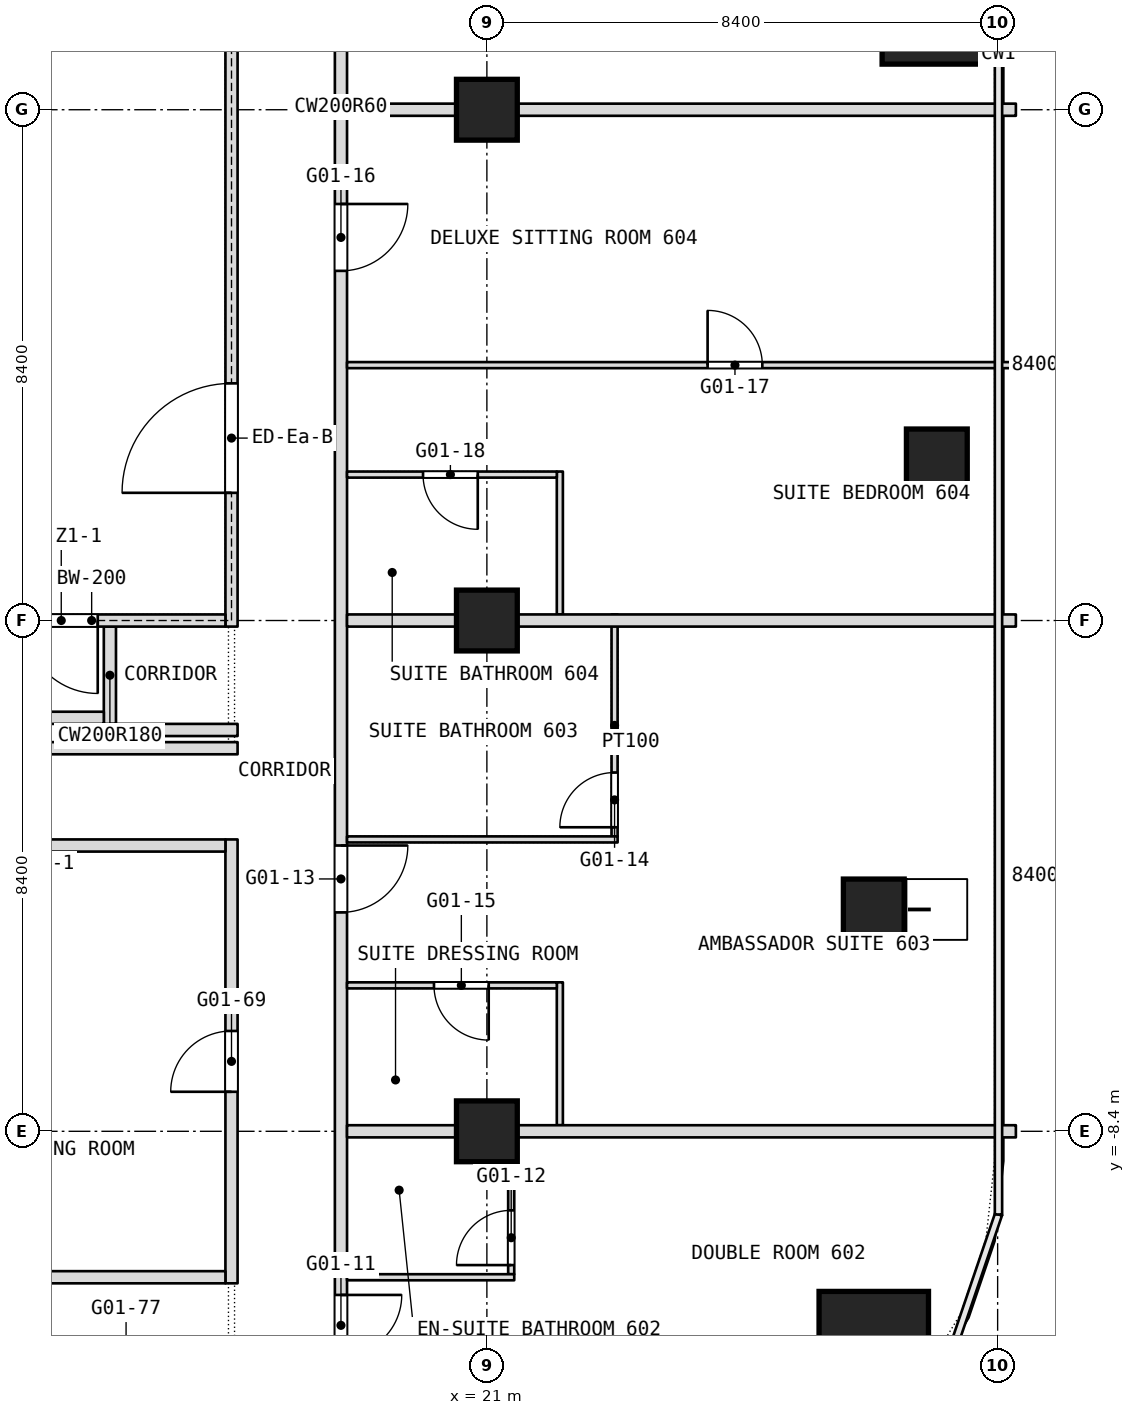
"""IFC4 building model, lengths in metres.
Left out: names, types, materials, properties, quantities, classifications, styles, units other than length and angle.
Written with IfcOpenShell. Run it as: python <this file> out.ifc"""

import sys

from ifc_helpers import new_model, si_unit, direction, frame, frame_2d, origin, origin_2d, place, context, subcontext, project, spatial, rectangle, extrude, element, fill, save


model = new_model("IFC4")
c1 = context("Model", 3, precision=1e-05, world=origin(), true_north=direction((0.0, 1.0)))
c2 = subcontext(c1, "Body", "Model", "MODEL_VIEW")
j1 = project(units=[si_unit("LENGTHUNIT", "METRE"), si_unit("PLANEANGLEUNIT", "RADIAN")], contexts=[c1])
p1 = place(None, origin())
s1 = spatial("IfcSite", under=j1, at=p1, CompositionType="ELEMENT")
p2 = place(p1, origin())
s2 = spatial("IfcBuilding", under=s1, at=p2, CompositionType="ELEMENT")
p3 = place(p2, frame((0.0, 0.0, 36.5)))
s3 = spatial("IfcBuildingStorey", under=s2, at=p3, CompositionType="ELEMENT", Elevation=36.5)
p4 = place(p3, frame((27.363, -11.933, -0.15), z_axis=(0.0, 0.0, 1.0), x_axis=(1.0, 0.0, 0.0)))
e1 = element("IfcColumn", 1, at=p4, inside=s3, PredefinedType="COLUMN", context=c2, shape_type="SweptSolid", body=[
    extrude(rectangle(XDim=1.8, YDim=1.8, at=origin_2d()), origin(), (0.0, 0.0, 1.0), 3.75),
])
p5 = place(p3, frame((28.4, 10.05, 0.0), z_axis=(0.0, 0.0, 1.0), x_axis=(1.0, 0.0, 0.0)))
e2 = element("IfcColumn", 2, at=p5, inside=s3, PredefinedType="COLUMN", context=c2, shape_type="SweptSolid", body=[
    extrude(rectangle(XDim=1.8, YDim=1.8, at=origin_2d()), origin(), (0.0, 0.0, 1.0), 3.6),
])
p6 = place(p3, frame((21.0, -8.4, -0.15), z_axis=(0.0, 0.0, 1.0), x_axis=(1.0, 0.0, 0.0)))
e3 = element("IfcColumn", 3, at=p6, inside=s3, PredefinedType="COLUMN", context=c2, shape_type="SweptSolid", body=[
    extrude(rectangle(XDim=1.0, YDim=1.0, at=origin_2d()), origin(), (0.0, 0.0, 1.0), 3.75),
])
for number, where, z_axis, x_axis in (
    (4, (21.0, 0.0, 0.0), (0.0, 0.0, 1.0), (1.0, 0.0, 0.0)),
    (5, (21.0, 8.4, 0.0), (0.0, 0.0, 1.0), (1.0, 0.0, 0.0)),
    (6, (28.4, 2.649, 0.0), (0.0, 0.0, 1.0), (1.0, 0.0, 0.0)),
):
    element("IfcColumn", number, at=place(p3, frame(where, z_axis=z_axis, x_axis=x_axis)), inside=s3, PredefinedType="COLUMN", context=c2, shape_type="SweptSolid", body=[
        extrude(rectangle(XDim=1.0, YDim=1.0, at=origin_2d()), origin(), (0.0, 0.0, 1.0), 3.6),
    ])
p7 = place(p3, frame((23.1, -3.55, 0.0), z_axis=(0.0, 0.0, 1.0), x_axis=(0.0, 1.0, 0.0)))
e7 = element("IfcWall", 7, at=p7, inside=s3, PredefinedType="PARTITIONING", context=c2, shape_type="SweptSolid", body=[
    extrude(rectangle(XDim=3.65, YDim=0.1, at=frame_2d((1.825, 0.0))), origin(), (0.0, 0.0, 1.0), 3.34),
])
p8 = place(p7, frame((0.15, 0.0, 0.0)))
e8 = element("IfcOpeningElement", 8, at=p8, cuts=e7, PredefinedType="OPENING", context=c2, shape_type="SweptSolid", body=[
    extrude(rectangle(XDim=0.9, YDim=2.1, at=frame_2d((0.45, 1.05))), frame((0.0, 0.05, 0.0), z_axis=(0.0, -1.0, 0.0), x_axis=(1.0, 0.0, 0.0)), (0.0, 0.0, 1.0), 0.1),
])
p9 = place(p3, frame((22.2, -8.3, 0.0), z_axis=(0.0, 0.0, 1.0), x_axis=(0.0, 1.0, 0.0)))
e9 = element("IfcWall", 9, at=p9, inside=s3, PredefinedType="PARTITIONING", context=c2, shape_type="SweptSolid", body=[
    extrude(rectangle(XDim=2.35, YDim=0.1, at=frame_2d((1.175, 0.0))), origin(), (0.0, 0.0, 1.0), 3.34),
])
p10 = place(p3, frame((22.2, 0.1, 0.0), z_axis=(0.0, 0.0, 1.0), x_axis=(0.0, 1.0, 0.0)))
e10 = element("IfcWall", 10, at=p10, inside=s3, PredefinedType="PARTITIONING", context=c2, shape_type="SweptSolid", body=[
    extrude(rectangle(XDim=2.35, YDim=0.1, at=frame_2d((1.175, 0.0))), origin(), (0.0, 0.0, 1.0), 3.34),
])
p11 = place(p3, frame((21.4, -10.75, 0.0), z_axis=(0.0, 0.0, 1.0), x_axis=(0.0, 1.0, 0.0)))
e11 = element("IfcWall", 11, at=p11, inside=s3, PredefinedType="PARTITIONING", context=c2, shape_type="SweptSolid", body=[
    extrude(rectangle(XDim=2.45, YDim=0.1, at=frame_2d((1.225, 0.0))), origin(), (0.0, 0.0, 1.0), 3.34),
])
p12 = place(p11, frame((0.15, 0.0, 0.0)))
e12 = element("IfcOpeningElement", 12, at=p12, cuts=e11, PredefinedType="OPENING", context=c2, shape_type="SweptSolid", body=[
    extrude(rectangle(XDim=0.9, YDim=2.1, at=frame_2d((0.45, 1.05))), frame((0.0, 0.05, 0.0), z_axis=(0.0, -1.0, 0.0), x_axis=(1.0, 0.0, 0.0)), (0.0, 0.0, 1.0), 0.1),
])
p13 = place(p3, frame((18.6, -16.665, 0.0), z_axis=(0.0, 0.0, 1.0), x_axis=(0.0, 1.0, 0.0)))
e13 = element("IfcWall", 13, at=p13, inside=s3, PredefinedType="PARTITIONING", context=c2, shape_type="SweptSolid", body=[
    extrude(rectangle(XDim=50.205, YDim=0.2, at=frame_2d((25.103, 0.0))), origin(), (0.0, 0.0, 1.0), 3.34),
])
p14 = place(p13, frame((2.991, 0.0, 0.0)))
e14 = element("IfcOpeningElement", 14, at=p14, cuts=e13, PredefinedType="OPENING", context=c2, shape_type="SweptSolid", body=[
    extrude(rectangle(XDim=1.0, YDim=2.1, at=frame_2d((0.5, 1.05))), frame((0.0, 0.1, 0.0), z_axis=(0.0, -1.0, 0.0), x_axis=(1.0, 0.0, 0.0)), (0.0, 0.0, 1.0), 0.2),
])
p15 = place(p13, frame((4.574, 0.0, 0.0)))
e15 = element("IfcOpeningElement", 15, at=p15, cuts=e13, PredefinedType="OPENING", context=c2, shape_type="SweptSolid", body=[
    extrude(rectangle(XDim=1.0, YDim=2.1, at=frame_2d((0.5, 1.05))), frame((0.0, 0.1, 0.0), z_axis=(0.0, -1.0, 0.0), x_axis=(1.0, 0.0, 0.0)), (0.0, 0.0, 1.0), 0.2),
])
p16 = place(p13, frame((11.865, 0.0, 0.0)))
e16 = element("IfcOpeningElement", 16, at=p16, cuts=e13, PredefinedType="OPENING", context=c2, shape_type="SweptSolid", body=[
    extrude(rectangle(XDim=1.1, YDim=2.1, at=frame_2d((0.55, 1.05))), frame((0.0, 0.1, 0.0), z_axis=(0.0, -1.0, 0.0), x_axis=(1.0, 0.0, 0.0)), (0.0, 0.0, 1.0), 0.2),
])
p17 = place(p13, frame((22.415, 0.0, 0.0)))
e17 = element("IfcOpeningElement", 17, at=p17, cuts=e13, PredefinedType="OPENING", context=c2, shape_type="SweptSolid", body=[
    extrude(rectangle(XDim=1.1, YDim=2.1, at=frame_2d((0.55, 1.05))), frame((0.0, 0.1, 0.0), z_axis=(0.0, -1.0, 0.0), x_axis=(1.0, 0.0, 0.0)), (0.0, 0.0, 1.0), 0.2),
])
p18 = place(p13, frame((28.365, 0.0, 0.0)))
e18 = element("IfcOpeningElement", 18, at=p18, cuts=e13, PredefinedType="OPENING", context=c2, shape_type="SweptSolid", body=[
    extrude(rectangle(XDim=1.8, YDim=2.1, at=frame_2d((0.9, 1.05))), frame((0.0, 0.1, 0.0), z_axis=(0.0, -1.0, 0.0), x_axis=(1.0, 0.0, 0.0)), (0.0, 0.0, 1.0), 0.2),
])
p19 = place(p13, frame((36.765, 0.0, 0.0)))
e19 = element("IfcOpeningElement", 19, at=p19, cuts=e13, PredefinedType="OPENING", context=c2, shape_type="SweptSolid", body=[
    extrude(rectangle(XDim=1.8, YDim=2.1, at=frame_2d((0.9, 1.05))), frame((0.0, 0.1, 0.0), z_axis=(0.0, -1.0, 0.0), x_axis=(1.0, 0.0, 0.0)), (0.0, 0.0, 1.0), 0.2),
])
p20 = place(p13, frame((42.265, 0.0, 0.0)))
e20 = element("IfcOpeningElement", 20, at=p20, cuts=e13, PredefinedType="OPENING", context=c2, shape_type="SweptSolid", body=[
    extrude(rectangle(XDim=1.0, YDim=2.1, at=frame_2d((0.5, 1.05))), frame((0.0, 0.1, 0.0), z_axis=(0.0, -1.0, 0.0), x_axis=(1.0, 0.0, 0.0)), (0.0, 0.0, 1.0), 0.2),
])
p21 = place(p13, frame((47.465, 0.0, 0.0)))
e21 = element("IfcOpeningElement", 21, at=p21, cuts=e13, PredefinedType="OPENING", context=c2, shape_type="SweptSolid", body=[
    extrude(rectangle(XDim=1.0, YDim=2.1, at=frame_2d((0.5, 1.05))), frame((0.0, 0.1, 0.0), z_axis=(0.0, -1.0, 0.0), x_axis=(1.0, 0.0, 0.0)), (0.0, 0.0, 1.0), 0.2),
])
p22 = place(p3, frame((16.8, -10.9, 0.0), z_axis=(0.0, 0.0, 1.0), x_axis=(0.0, 1.0, 0.0)))
e22 = element("IfcWall", 22, at=p22, inside=s3, PredefinedType="PARTITIONING", context=c2, shape_type="SweptSolid", body=[
    extrude(rectangle(XDim=7.3, YDim=0.2, at=frame_2d((3.65, 0.0))), origin(), (0.0, 0.0, 1.0), 3.34),
])
p23 = place(p22, frame((3.15, 0.0, 0.0)))
e23 = element("IfcOpeningElement", 23, at=p23, cuts=e22, PredefinedType="OPENING", context=c2, shape_type="SweptSolid", body=[
    extrude(rectangle(XDim=1.0, YDim=2.1, at=frame_2d((0.5, 1.05))), frame((0.0, 0.1, 0.0), z_axis=(0.0, -1.0, 0.0), x_axis=(1.0, 0.0, 0.0)), (0.0, 0.0, 1.0), 0.2),
])
p24 = place(p3, frame((14.8, -1.7, 0.0), z_axis=(0.0, 0.0, 1.0), x_axis=(0.0, 1.0, 0.0)))
e24 = element("IfcWall", 24, at=p24, inside=s3, PredefinedType="PARTITIONING", context=c2, shape_type="SweptSolid", body=[
    extrude(rectangle(XDim=1.6, YDim=0.2, at=frame_2d((0.8, 0.0))), origin(), (0.0, 0.0, 1.0), 3.34),
])
p25 = place(p3, frame((18.7, -10.8, 0.0), z_axis=(0.0, 0.0, 1.0), x_axis=(1.0, 0.0, 0.0)))
e25 = element("IfcWall", 25, at=p25, inside=s3, PredefinedType="PARTITIONING", context=c2, shape_type="SweptSolid", body=[
    extrude(rectangle(XDim=2.75, YDim=0.1, at=frame_2d((1.375, 0.0))), origin(), (0.0, 0.0, 1.0), 3.34),
])
p26 = place(p3, frame((4.3, -10.8, 0.0), z_axis=(0.0, 0.0, 1.0), x_axis=(1.0, 0.0, 0.0)))
e26 = element("IfcWall", 26, at=p26, inside=s3, PredefinedType="PARTITIONING", context=c2, shape_type="SweptSolid", body=[
    extrude(rectangle(XDim=12.4, YDim=0.2, at=frame_2d((6.2, 0.0))), origin(), (0.0, 0.0, 1.0), 3.34),
])
p27 = place(p3, frame((18.7, -8.4, 0.0), z_axis=(0.0, 0.0, 1.0), x_axis=(1.0, 0.0, 0.0)))
e27 = element("IfcWall", 27, at=p27, inside=s3, PredefinedType="PARTITIONING", context=c2, shape_type="SweptSolid", body=[
    extrude(rectangle(XDim=11.0, YDim=0.2, at=frame_2d((5.5, 0.0))), origin(), (0.0, 0.0, 1.0), 2.84),
])
p28 = place(p3, frame((18.7, -6.0, 0.0), z_axis=(0.0, 0.0, 1.0), x_axis=(1.0, 0.0, 0.0)))
e28 = element("IfcWall", 28, at=p28, inside=s3, PredefinedType="PARTITIONING", context=c2, shape_type="SweptSolid", body=[
    extrude(rectangle(XDim=3.45, YDim=0.1, at=frame_2d((1.725, 0.0))), origin(), (0.0, 0.0, 1.0), 3.34),
])
p29 = place(p28, frame((1.43, 0.0, 0.0)))
e29 = element("IfcOpeningElement", 29, at=p29, cuts=e28, PredefinedType="OPENING", context=c2, shape_type="SweptSolid", body=[
    extrude(rectangle(XDim=0.9, YDim=2.1, at=frame_2d((0.45, 1.05))), frame((0.0, 0.05, 0.0), z_axis=(0.0, -1.0, 0.0), x_axis=(1.0, 0.0, 0.0)), (0.0, 0.0, 1.0), 0.1),
])
p30 = place(p3, frame((12.7, -3.7, 0.0), z_axis=(0.0, 0.0, 1.0), x_axis=(1.0, 0.0, 0.0)))
e30 = element("IfcWall", 30, at=p30, inside=s3, PredefinedType="PARTITIONING", context=c2, shape_type="SweptSolid", body=[
    extrude(rectangle(XDim=4.0, YDim=0.2, at=frame_2d((2.0, 0.0))), origin(), (0.0, 0.0, 1.0), 3.34),
])
p31 = place(p3, frame((18.7, -3.6, 0.0), z_axis=(0.0, 0.0, 1.0), x_axis=(1.0, 0.0, 0.0)))
e31 = element("IfcWall", 31, at=p31, inside=s3, PredefinedType="PARTITIONING", context=c2, shape_type="SweptSolid", body=[
    extrude(rectangle(XDim=4.45, YDim=0.1, at=frame_2d((2.225, 0.0))), origin(), (0.0, 0.0, 1.0), 3.34),
])
p32 = place(p3, frame((12.8, -2.1, 0.0), z_axis=(0.0, 0.0, 1.0), x_axis=(1.0, 0.0, 0.0)))
e32 = element("IfcWall", 32, at=p32, inside=s3, PredefinedType="PARTITIONING", context=c2, shape_type="SweptSolid", body=[
    extrude(rectangle(XDim=4.1, YDim=0.2, at=frame_2d((2.05, 0.0))), origin(), (0.0, 0.0, 1.0), 3.34),
])
p33 = place(p3, frame((14.8, -1.8, 0.0), z_axis=(0.0, 0.0, 1.0), x_axis=(1.0, 0.0, 0.0)))
e33 = element("IfcWall", 33, at=p33, inside=s3, PredefinedType="PARTITIONING", context=c2, shape_type="SweptSolid", body=[
    extrude(rectangle(XDim=2.1, YDim=0.2, at=frame_2d((1.05, 0.0))), origin(), (0.0, 0.0, 1.0), 3.34),
])
p34 = place(p3, frame((10.5, -1.6, 0.0), z_axis=(0.0, 0.0, 1.0), x_axis=(1.0, 0.0, 0.0)))
e34 = element("IfcWall", 34, at=p34, inside=s3, PredefinedType="PARTITIONING", context=c2, shape_type="SweptSolid", body=[
    extrude(rectangle(XDim=4.2, YDim=0.2, at=frame_2d((2.1, 0.0))), origin(), (0.0, 0.0, 1.0), 3.34),
])
p35 = place(p34, frame((0.15, 0.0, 0.0)))
e35 = element("IfcOpeningElement", 35, at=p35, cuts=e34, PredefinedType="OPENING", context=c2, shape_type="SweptSolid", body=[
    extrude(rectangle(XDim=1.0, YDim=2.1, at=frame_2d((0.5, 1.05))), frame((0.0, 0.1, 0.0), z_axis=(0.0, -1.0, 0.0), x_axis=(1.0, 0.0, 0.0)), (0.0, 0.0, 1.0), 0.2),
])
p36 = place(p3, frame((18.7, 0.0, 0.0), z_axis=(0.0, 0.0, 1.0), x_axis=(1.0, 0.0, 0.0)))
e36 = element("IfcWall", 36, at=p36, inside=s3, PredefinedType="PARTITIONING", context=c2, shape_type="SweptSolid", body=[
    extrude(rectangle(XDim=11.0, YDim=0.2, at=frame_2d((5.5, 0.0))), origin(), (0.0, 0.0, 1.0), 2.84),
])
p37 = place(p3, frame((18.7, 2.4, 0.0), z_axis=(0.0, 0.0, 1.0), x_axis=(1.0, 0.0, 0.0)))
e37 = element("IfcWall", 37, at=p37, inside=s3, PredefinedType="PARTITIONING", context=c2, shape_type="SweptSolid", body=[
    extrude(rectangle(XDim=3.45, YDim=0.1, at=frame_2d((1.725, 0.0))), origin(), (0.0, 0.0, 1.0), 3.34),
])
p38 = place(p37, frame((1.25, 0.0, 0.0)))
e38 = element("IfcOpeningElement", 38, at=p38, cuts=e37, PredefinedType="OPENING", context=c2, shape_type="SweptSolid", body=[
    extrude(rectangle(XDim=0.9, YDim=2.1, at=frame_2d((0.45, 1.05))), frame((0.0, 0.05, 0.0), z_axis=(0.0, -1.0, 0.0), x_axis=(1.0, 0.0, 0.0)), (0.0, 0.0, 1.0), 0.1),
])
p39 = place(p3, frame((18.7, 4.2, 0.0), z_axis=(0.0, 0.0, 1.0), x_axis=(1.0, 0.0, 0.0)))
e39 = element("IfcWall", 39, at=p39, inside=s3, PredefinedType="PARTITIONING", context=c2, shape_type="SweptSolid", body=[
    extrude(rectangle(XDim=11.0, YDim=0.1, at=frame_2d((5.5, 0.0))), origin(), (0.0, 0.0, 1.0), 3.34),
])
p40 = place(p39, frame((5.93, 0.0, 0.0)))
e40 = element("IfcOpeningElement", 40, at=p40, cuts=e39, PredefinedType="OPENING", context=c2, shape_type="SweptSolid", body=[
    extrude(rectangle(XDim=0.9, YDim=2.1, at=frame_2d((0.45, 1.05))), frame((0.0, 0.05, 0.0), z_axis=(0.0, -1.0, 0.0), x_axis=(1.0, 0.0, 0.0)), (0.0, 0.0, 1.0), 0.1),
])
p41 = place(p3, frame((18.7, 8.4, 0.0), z_axis=(0.0, 0.0, 1.0), x_axis=(1.0, 0.0, 0.0)))
e41 = element("IfcWall", 41, at=p41, inside=s3, PredefinedType="PARTITIONING", context=c2, shape_type="SweptSolid", body=[
    extrude(rectangle(XDim=11.0, YDim=0.2, at=frame_2d((5.5, 0.0))), origin(), (0.0, 0.0, 1.0), 2.84),
])
p42 = place(p3, frame((16.8, -0.1, 0.0), z_axis=(0.0, 0.0, 1.0), x_axis=(0.0, 1.0, 0.0)))
e42 = element("IfcWall", 42, at=p42, inside=s3, PredefinedType="PARTITIONING", context=c2, shape_type="SweptSolid", body=[
    extrude(rectangle(XDim=17.0, YDim=0.2, at=frame_2d((8.5, 0.0))), origin(), (0.0, 0.0, 1.0), 3.34),
])
p43 = place(p42, frame((2.2, 0.0, 0.0)))
e43 = element("IfcOpeningElement", 43, at=p43, cuts=e42, PredefinedType="OPENING", context=c2, shape_type="SweptSolid", body=[
    extrude(rectangle(XDim=1.8, YDim=2.1, at=frame_2d((0.9, 1.05))), frame((0.0, 0.1, 0.0), z_axis=(0.0, -1.0, 0.0), x_axis=(1.0, 0.0, 0.0)), (0.0, 0.0, 1.0), 0.2),
])
p44 = place(p42, frame((13.0, 0.0, 0.0)))
e44 = element("IfcOpeningElement", 44, at=p44, cuts=e42, PredefinedType="OPENING", context=c2, shape_type="SweptSolid", body=[
    extrude(rectangle(XDim=1.8, YDim=2.1, at=frame_2d((0.9, 1.05))), frame((0.0, 0.1, 0.0), z_axis=(0.0, -1.0, 0.0), x_axis=(1.0, 0.0, 0.0)), (0.0, 0.0, 1.0), 0.2),
])
p45 = place(p3, frame((12.3, 0.0, 0.0), z_axis=(0.0, 0.0, 1.0), x_axis=(1.0, 0.0, 0.0)))
e45 = element("IfcWall", 45, at=p45, inside=s3, PredefinedType="PARTITIONING", context=c2, shape_type="SweptSolid", body=[
    extrude(rectangle(XDim=4.4, YDim=0.2, at=frame_2d((2.2, 0.0))), origin(), (0.0, 0.0, 1.0), 2.84),
])
p46 = place(p45, frame((1.1, 0.0, 0.0)))
e46 = element("IfcOpeningElement", 46, at=p46, cuts=e45, PredefinedType="OPENING", context=c2, shape_type="SweptSolid", body=[
    extrude(rectangle(XDim=1.2, YDim=2.1, at=frame_2d((0.6, 1.05))), frame((0.0, 0.1, 0.0), z_axis=(0.0, -1.0, 0.0), x_axis=(1.0, 0.0, 0.0)), (0.0, 0.0, 1.0), 0.2),
])
p47 = place(p8, origin())
e47 = element("IfcDoor", 47, at=p47, inside=s3, OperationType="SINGLE_SWING_LEFT", PredefinedType="DOOR", context=c2, shape_type="SweptSolid", body=[
    extrude(rectangle(XDim=0.9, YDim=2.1, at=frame_2d((0.45, 1.05))), frame((0.0, 0.025, 0.0), z_axis=(0.0, -1.0, 0.0), x_axis=(1.0, 0.0, 0.0)), (0.0, 0.0, 1.0), 0.05),
])
fill(e8, e47)
p48 = place(p12, origin())
e48 = element("IfcDoor", 48, at=p48, inside=s3, OperationType="SINGLE_SWING_LEFT", PredefinedType="DOOR", context=c2, shape_type="SweptSolid", body=[
    extrude(rectangle(XDim=0.9, YDim=2.1, at=frame_2d((0.45, 1.05))), frame((0.0, 0.025, 0.0), z_axis=(0.0, -1.0, 0.0), x_axis=(1.0, 0.0, 0.0)), (0.0, 0.0, 1.0), 0.05),
])
fill(e12, e48)
p49 = place(p15, origin())
e49 = element("IfcDoor", 49, at=p49, inside=s3, OperationType="SINGLE_SWING_LEFT", PredefinedType="DOOR", context=c2, shape_type="SweptSolid", body=[
    extrude(rectangle(XDim=1.0, YDim=2.1, at=frame_2d((0.5, 1.05))), frame((0.0, 0.025, 0.0), z_axis=(0.0, -1.0, 0.0), x_axis=(1.0, 0.0, 0.0)), (0.0, 0.0, 1.0), 0.05),
])
fill(e15, e49)
p50 = place(p16, origin())
e50 = element("IfcDoor", 50, at=p50, inside=s3, OperationType="SINGLE_SWING_LEFT", PredefinedType="DOOR", context=c2, shape_type="SweptSolid", body=[
    extrude(rectangle(XDim=1.1, YDim=2.1, at=frame_2d((0.55, 1.05))), frame((0.0, 0.025, 0.0), z_axis=(0.0, -1.0, 0.0), x_axis=(1.0, 0.0, 0.0)), (0.0, 0.0, 1.0), 0.05),
])
fill(e16, e50)
p51 = place(p17, origin())
e51 = element("IfcDoor", 51, at=p51, inside=s3, OperationType="SINGLE_SWING_RIGHT", PredefinedType="DOOR", context=c2, shape_type="SweptSolid", body=[
    extrude(rectangle(XDim=1.1, YDim=2.1, at=frame_2d((0.55, 1.05))), frame((0.0, 0.025, 0.0), z_axis=(0.0, -1.0, 0.0), x_axis=(1.0, 0.0, 0.0)), (0.0, 0.0, 1.0), 0.05),
])
fill(e17, e51)
p52 = place(p23, origin())
e52 = element("IfcDoor", 52, at=p52, inside=s3, OperationType="SINGLE_SWING_LEFT", PredefinedType="DOOR", context=c2, shape_type="SweptSolid", body=[
    extrude(rectangle(XDim=1.0, YDim=2.1, at=frame_2d((0.5, 1.05))), frame((0.0, 0.025, 0.0), z_axis=(0.0, -1.0, 0.0), x_axis=(1.0, 0.0, 0.0)), (0.0, 0.0, 1.0), 0.05),
])
fill(e23, e52)
p53 = place(p29, origin())
e53 = element("IfcDoor", 53, at=p53, inside=s3, OperationType="SINGLE_SWING_LEFT", PredefinedType="DOOR", context=c2, shape_type="SweptSolid", body=[
    extrude(rectangle(XDim=0.9, YDim=2.1, at=frame_2d((0.45, 1.05))), frame((0.0, 0.025, 0.0), z_axis=(0.0, -1.0, 0.0), x_axis=(1.0, 0.0, 0.0)), (0.0, 0.0, 1.0), 0.05),
])
fill(e29, e53)
p54 = place(p38, origin())
e54 = element("IfcDoor", 54, at=p54, inside=s3, OperationType="SINGLE_SWING_RIGHT", PredefinedType="DOOR", context=c2, shape_type="SweptSolid", body=[
    extrude(rectangle(XDim=0.9, YDim=2.1, at=frame_2d((0.45, 1.05))), frame((0.0, 0.025, 0.0), z_axis=(0.0, -1.0, 0.0), x_axis=(1.0, 0.0, 0.0)), (0.0, 0.0, 1.0), 0.05),
])
fill(e38, e54)
p55 = place(p40, origin())
e55 = element("IfcDoor", 55, at=p55, inside=s3, OperationType="SINGLE_SWING_LEFT", PredefinedType="DOOR", context=c2, shape_type="SweptSolid", body=[
    extrude(rectangle(XDim=0.9, YDim=2.1, at=frame_2d((0.45, 1.05))), frame((0.0, 0.025, 0.0), z_axis=(0.0, -1.0, 0.0), x_axis=(1.0, 0.0, 0.0)), (0.0, 0.0, 1.0), 0.05),
])
fill(e40, e55)
p56 = place(p43, origin())
e56 = element("IfcDoor", 56, at=p56, inside=s3, OperationType="DOUBLE_DOOR_SINGLE_SWING", PredefinedType="DOOR", context=c2, shape_type="SweptSolid", body=[
    extrude(rectangle(XDim=1.8, YDim=2.1, at=frame_2d((0.9, 1.05))), frame((0.0, 0.025, 0.0), z_axis=(0.0, -1.0, 0.0), x_axis=(1.0, 0.0, 0.0)), (0.0, 0.0, 1.0), 0.05),
])
fill(e43, e56)
p57 = place(p46, origin())
e57 = element("IfcDoor", 57, at=p57, inside=s3, OperationType="SINGLE_SWING_LEFT", PredefinedType="DOOR", context=c2, shape_type="SweptSolid", body=[
    extrude(rectangle(XDim=1.2, YDim=2.1, at=frame_2d((0.6, 1.05))), frame((0.0, 0.025, 0.0), z_axis=(0.0, -1.0, 0.0), x_axis=(1.0, 0.0, 0.0)), (0.0, 0.0, 1.0), 0.05),
])
fill(e46, e57)
save(model, sys.argv[1])
